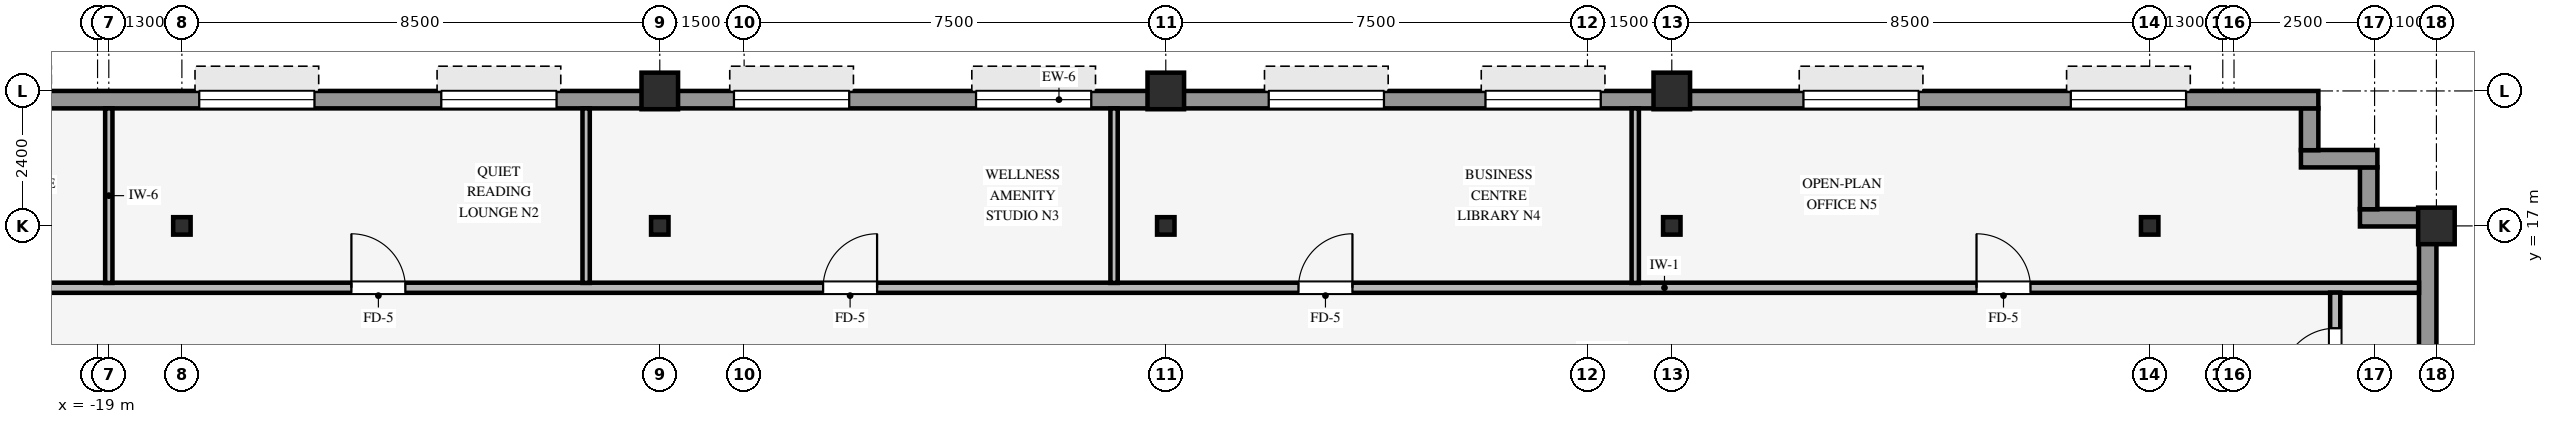
"""IFC4 building model, lengths in metres.
Left out: names, types, materials, properties, quantities, classifications, styles, units other than length and angle.
Written with IfcOpenShell. Run it as: python <this file> out.ifc"""

import sys

from ifc_helpers import new_model, si_unit, direction, frame, frame_2d, origin, origin_2d, place, context, subcontext, project, spatial, rectangle, hollow_rectangle, i_section, extrude, source, transform, mapped, element, fill, save


model = new_model("IFC4")
c1 = context("Model", 3, precision=1e-05, world=origin(), true_north=direction((0.0, 1.0)))
c2 = subcontext(c1, "Body", "Model", "MODEL_VIEW")
j1 = project(units=[si_unit("LENGTHUNIT", "METRE"), si_unit("PLANEANGLEUNIT", "RADIAN")], contexts=[c1])
p1 = place(None, origin())
s1 = spatial("IfcSite", under=j1, at=p1, CompositionType="ELEMENT")
p2 = place(p1, origin())
s2 = spatial("IfcBuilding", under=s1, at=p2, CompositionType="ELEMENT")
p3 = place(p2, frame((0.0, 0.0, 174.95)))
s3 = spatial("IfcBuildingStorey", under=s2, at=p3, CompositionType="ELEMENT", Elevation=174.95)
for number, where, z_axis, x_axis in (
    (1, (22.6, 17.0, 0.0), (0.0, 0.0, 1.0), (1.0, 0.0, 0.0)),
    (2, (-9.0, 19.4, 0.0), (0.0, 0.0, 1.0), (1.0, 0.0, 0.0)),
    (3, (0.0, 19.4, 0.0), (0.0, 0.0, 1.0), (1.0, 0.0, 0.0)),
    (4, (9.0, 19.4, 0.0), (0.0, 0.0, 1.0), (1.0, 0.0, 0.0)),
):
    element("IfcColumn", number, at=place(p3, frame(where, z_axis=z_axis, x_axis=x_axis)), inside=s3, PredefinedType="COLUMN", context=c2, shape_type="SweptSolid", body=[
        extrude(hollow_rectangle(XDim=0.65, YDim=0.65, WallThickness=0.04, InnerFilletRadius=0.04, OuterFilletRadius=0.08, at=origin_2d()), origin(), (0.0, 0.0, 1.0), 3.37),
    ])
for number, where, z_axis, x_axis in (
    (5, (0.0, 17.0, 0.0), (0.0, 0.0, 1.0), (1.0, 0.0, 0.0)),
    (6, (-17.5, 17.0, 0.0), (0.0, 0.0, 1.0), (1.0, 0.0, 0.0)),
    (7, (-9.0, 17.0, 0.0), (0.0, 0.0, 1.0), (1.0, 0.0, 0.0)),
    (8, (9.0, 17.0, 0.0), (0.0, 0.0, 1.0), (1.0, 0.0, 0.0)),
    (9, (17.5, 17.0, 0.0), (0.0, 0.0, 1.0), (1.0, 0.0, 0.0)),
):
    element("IfcColumn", number, at=place(p3, frame(where, z_axis=z_axis, x_axis=x_axis)), inside=s3, PredefinedType="COLUMN", context=c2, shape_type="SweptSolid", body=[
        extrude(i_section(OverallWidth=0.31, OverallDepth=0.31, WebThickness=0.015, FlangeThickness=0.015, FilletRadius=0.015, at=origin_2d()), origin(), (0.0, 0.0, 1.0), 3.37),
    ])
p4 = place(p3, frame((22.445, -20.794, 0.0), z_axis=(0.0, 0.0, 1.0), x_axis=(0.0, 1.0, 0.0)))
e10 = element("IfcWall", 10, at=p4, inside=s3, PredefinedType="STANDARD", context=c2, shape_type="SweptSolid", body=[
    extrude(rectangle(XDim=37.788, YDim=0.31, at=frame_2d((18.894, 0.0))), origin(), (0.0, 0.0, 1.0), 2.705),
])
p5 = place(p4, frame((16.474, 0.0, 0.0), z_axis=(0.0, 0.0, 1.0), x_axis=(-1.0, 0.0, 0.0)))
e11 = element("IfcOpeningElement", 11, at=p5, cuts=e10, PredefinedType="OPENING", context=c2, shape_type="SweptSolid", body=[
    extrude(rectangle(XDim=0.98, YDim=2.15, at=frame_2d((0.49, 1.075))), frame((0.0, 0.165, 0.0), z_axis=(0.0, -1.0, 0.0), x_axis=(1.0, 0.0, 0.0)), (0.0, 0.0, 1.0), 0.33),
])
p6 = place(p4, frame((1.581, 0.0, 0.8)))
e12 = element("IfcOpeningElement", 12, at=p6, cuts=e10, PredefinedType="OPENING", context=c2, shape_type="SweptSolid", body=[
    extrude(rectangle(XDim=1.25, YDim=1.52, at=frame_2d((0.625, 0.76))), frame((0.0, 0.165, 0.0), z_axis=(0.0, -1.0, 0.0), x_axis=(1.0, 0.0, 0.0)), (0.0, 0.0, 1.0), 0.33),
])
p7 = place(p4, frame((8.044, 0.0, 0.8)))
e13 = element("IfcOpeningElement", 13, at=p7, cuts=e10, PredefinedType="OPENING", context=c2, shape_type="SweptSolid", body=[
    extrude(rectangle(XDim=1.25, YDim=1.52, at=frame_2d((0.625, 0.76))), frame((0.0, 0.165, 0.0), z_axis=(0.0, -1.0, 0.0), x_axis=(1.0, 0.0, 0.0)), (0.0, 0.0, 1.0), 0.33),
])
p8 = place(p4, frame((13.156, 0.0, 0.8)))
e14 = element("IfcOpeningElement", 14, at=p8, cuts=e10, PredefinedType="OPENING", context=c2, shape_type="SweptSolid", body=[
    extrude(rectangle(XDim=1.25, YDim=1.52, at=frame_2d((0.625, 0.76))), frame((0.0, 0.165, 0.0), z_axis=(0.0, -1.0, 0.0), x_axis=(1.0, 0.0, 0.0)), (0.0, 0.0, 1.0), 0.33),
])
p9 = place(p4, frame((18.269, 0.0, 0.8)))
e15 = element("IfcOpeningElement", 15, at=p9, cuts=e10, PredefinedType="OPENING", context=c2, shape_type="SweptSolid", body=[
    extrude(rectangle(XDim=1.25, YDim=1.52, at=frame_2d((0.625, 0.76))), frame((0.0, 0.165, 0.0), z_axis=(0.0, -1.0, 0.0), x_axis=(1.0, 0.0, 0.0)), (0.0, 0.0, 1.0), 0.33),
])
p10 = place(p4, frame((23.382, 0.0, 0.8)))
e16 = element("IfcOpeningElement", 16, at=p10, cuts=e10, PredefinedType="OPENING", context=c2, shape_type="SweptSolid", body=[
    extrude(rectangle(XDim=1.25, YDim=1.52, at=frame_2d((0.625, 0.76))), frame((0.0, 0.165, 0.0), z_axis=(0.0, -1.0, 0.0), x_axis=(1.0, 0.0, 0.0)), (0.0, 0.0, 1.0), 0.33),
])
p11 = place(p4, frame((28.044, 0.0, 0.8)))
e17 = element("IfcOpeningElement", 17, at=p11, cuts=e10, PredefinedType="OPENING", context=c2, shape_type="SweptSolid", body=[
    extrude(rectangle(XDim=1.25, YDim=1.52, at=frame_2d((0.625, 0.76))), frame((0.0, 0.165, 0.0), z_axis=(0.0, -1.0, 0.0), x_axis=(1.0, 0.0, 0.0)), (0.0, 0.0, 1.0), 0.33),
])
p12 = place(p4, frame((33.607, 0.0, 0.8)))
e18 = element("IfcOpeningElement", 18, at=p12, cuts=e10, PredefinedType="OPENING", context=c2, shape_type="SweptSolid", body=[
    extrude(rectangle(XDim=1.25, YDim=1.52, at=frame_2d((0.625, 0.76))), frame((0.0, 0.165, 0.0), z_axis=(0.0, -1.0, 0.0), x_axis=(1.0, 0.0, 0.0)), (0.0, 0.0, 1.0), 0.33),
])
p13 = place(p3, frame((21.24, 17.145, 0.0), z_axis=(0.0, 0.0, 1.0), x_axis=(1.0, 0.0, 0.0)))
e19 = element("IfcWall", 19, at=p13, inside=s3, PredefinedType="STANDARD", context=c2, shape_type="SweptSolid", body=[
    extrude(rectangle(XDim=1.36, YDim=0.31, at=frame_2d((0.68, 0.0))), origin(), (0.0, 0.0, 1.0), 2.816),
])
p14 = place(p3, frame((21.395, 17.296, 0.0), z_axis=(0.0, 0.0, 1.0), x_axis=(0.0, 1.0, 0.0)))
e20 = element("IfcWall", 20, at=p14, inside=s3, PredefinedType="STANDARD", context=c2, shape_type="SweptSolid", body=[
    extrude(rectangle(XDim=0.748, YDim=0.31, at=frame_2d((0.374, 0.0))), origin(), (0.0, 0.0, 1.0), 2.816),
])
p15 = place(p3, frame((20.19, 18.195, 0.0), z_axis=(0.0, 0.0, 1.0), x_axis=(1.0, 0.0, 0.0)))
e21 = element("IfcWall", 21, at=p15, inside=s3, PredefinedType="STANDARD", context=c2, shape_type="SweptSolid", body=[
    extrude(rectangle(XDim=1.36, YDim=0.31, at=frame_2d((0.68, 0.0))), origin(), (0.0, 0.0, 1.0), 2.816),
])
p16 = place(p3, frame((20.345, 18.346, 0.0), z_axis=(0.0, 0.0, 1.0), x_axis=(0.0, 1.0, 0.0)))
e22 = element("IfcWall", 22, at=p16, inside=s3, PredefinedType="STANDARD", context=c2, shape_type="SweptSolid", body=[
    extrude(rectangle(XDim=0.748, YDim=0.31, at=frame_2d((0.374, 0.0))), origin(), (0.0, 0.0, 1.0), 2.816),
])
p17 = place(p3, frame((-24.3, 19.245, 0.0), z_axis=(0.0, 0.0, 1.0), x_axis=(1.0, 0.0, 0.0)))
e23 = element("IfcWall", 23, at=p17, inside=s3, PredefinedType="STANDARD", context=c2, shape_type="SweptSolid", body=[
    extrude(rectangle(XDim=44.8, YDim=0.31, at=frame_2d((22.4, 0.0))), origin(), (0.0, 0.0, 1.0), 2.705),
])
p18 = place(p17, frame((2.353, 0.0, 0.8)))
e24 = element("IfcOpeningElement", 24, at=p18, cuts=e23, PredefinedType="OPENING", context=c2, shape_type="SweptSolid", body=[
    extrude(rectangle(XDim=2.05, YDim=1.52, at=frame_2d((1.025, 0.76))), frame((0.0, 0.165, 0.0), z_axis=(0.0, -1.0, 0.0), x_axis=(1.0, 0.0, 0.0)), (0.0, 0.0, 1.0), 0.33),
])
p19 = place(p17, frame((7.108, 0.0, 0.8)))
e25 = element("IfcOpeningElement", 25, at=p19, cuts=e23, PredefinedType="OPENING", context=c2, shape_type="SweptSolid", body=[
    extrude(rectangle(XDim=2.05, YDim=1.52, at=frame_2d((1.025, 0.76))), frame((0.0, 0.165, 0.0), z_axis=(0.0, -1.0, 0.0), x_axis=(1.0, 0.0, 0.0)), (0.0, 0.0, 1.0), 0.33),
])
p20 = place(p17, frame((11.414, 0.0, 0.8)))
e26 = element("IfcOpeningElement", 26, at=p20, cuts=e23, PredefinedType="OPENING", context=c2, shape_type="SweptSolid", body=[
    extrude(rectangle(XDim=2.05, YDim=1.52, at=frame_2d((1.025, 0.76))), frame((0.0, 0.165, 0.0), z_axis=(0.0, -1.0, 0.0), x_axis=(1.0, 0.0, 0.0)), (0.0, 0.0, 1.0), 0.33),
])
p21 = place(p17, frame((16.619, 0.0, 0.8)))
e27 = element("IfcOpeningElement", 27, at=p21, cuts=e23, PredefinedType="OPENING", context=c2, shape_type="SweptSolid", body=[
    extrude(rectangle(XDim=2.05, YDim=1.52, at=frame_2d((1.025, 0.76))), frame((0.0, 0.165, 0.0), z_axis=(0.0, -1.0, 0.0), x_axis=(1.0, 0.0, 0.0)), (0.0, 0.0, 1.0), 0.33),
])
p22 = place(p17, frame((20.925, 0.0, 0.8)))
e28 = element("IfcOpeningElement", 28, at=p22, cuts=e23, PredefinedType="OPENING", context=c2, shape_type="SweptSolid", body=[
    extrude(rectangle(XDim=2.05, YDim=1.52, at=frame_2d((1.025, 0.76))), frame((0.0, 0.165, 0.0), z_axis=(0.0, -1.0, 0.0), x_axis=(1.0, 0.0, 0.0)), (0.0, 0.0, 1.0), 0.33),
])
p23 = place(p17, frame((26.131, 0.0, 0.8)))
e29 = element("IfcOpeningElement", 29, at=p23, cuts=e23, PredefinedType="OPENING", context=c2, shape_type="SweptSolid", body=[
    extrude(rectangle(XDim=2.05, YDim=1.52, at=frame_2d((1.025, 0.76))), frame((0.0, 0.165, 0.0), z_axis=(0.0, -1.0, 0.0), x_axis=(1.0, 0.0, 0.0)), (0.0, 0.0, 1.0), 0.33),
])
p24 = place(p17, frame((29.986, 0.0, 0.8)))
e30 = element("IfcOpeningElement", 30, at=p24, cuts=e23, PredefinedType="OPENING", context=c2, shape_type="SweptSolid", body=[
    extrude(rectangle(XDim=2.05, YDim=1.52, at=frame_2d((1.025, 0.76))), frame((0.0, 0.165, 0.0), z_axis=(0.0, -1.0, 0.0), x_axis=(1.0, 0.0, 0.0)), (0.0, 0.0, 1.0), 0.33),
])
p25 = place(p17, frame((35.642, 0.0, 0.8)))
e31 = element("IfcOpeningElement", 31, at=p25, cuts=e23, PredefinedType="OPENING", context=c2, shape_type="SweptSolid", body=[
    extrude(rectangle(XDim=2.05, YDim=1.52, at=frame_2d((1.025, 0.76))), frame((0.0, 0.165, 0.0), z_axis=(0.0, -1.0, 0.0), x_axis=(1.0, 0.0, 0.0)), (0.0, 0.0, 1.0), 0.33),
])
p26 = place(p17, frame((40.397, 0.0, 0.8)))
e32 = element("IfcOpeningElement", 32, at=p26, cuts=e23, PredefinedType="OPENING", context=c2, shape_type="SweptSolid", body=[
    extrude(rectangle(XDim=2.05, YDim=1.52, at=frame_2d((1.025, 0.76))), frame((0.0, 0.165, 0.0), z_axis=(0.0, -1.0, 0.0), x_axis=(1.0, 0.0, 0.0)), (0.0, 0.0, 1.0), 0.33),
])
p27 = place(p3, frame((-26.09, 15.9, 0.0), z_axis=(0.0, 0.0, 1.0), x_axis=(1.0, 0.0, 0.0)))
e33 = element("IfcWall", 33, at=p27, inside=s3, PredefinedType="PARTITIONING", context=c2, shape_type="SweptSolid", body=[
    extrude(rectangle(XDim=48.38, YDim=0.18, at=frame_2d((24.19, 0.0))), origin(), (0.0, 0.0, 1.0), 3.36),
])
p28 = place(p27, frame((40.51, 0.0, 0.0)))
e34 = element("IfcOpeningElement", 34, at=p28, cuts=e33, PredefinedType="OPENING", context=c2, shape_type="SweptSolid", body=[
    extrude(rectangle(XDim=0.96, YDim=2.1, at=frame_2d((0.48, 1.05))), frame((0.0, 0.1, 0.0), z_axis=(0.0, -1.0, 0.0), x_axis=(1.0, 0.0, 0.0)), (0.0, 0.0, 1.0), 0.2),
])
p29 = place(p27, frame((19.995, 0.0, 0.0)))
e35 = element("IfcOpeningElement", 35, at=p29, cuts=e33, PredefinedType="OPENING", context=c2, shape_type="SweptSolid", body=[
    extrude(rectangle(XDim=0.96, YDim=2.1, at=frame_2d((0.48, 1.05))), frame((0.0, 0.1, 0.0), z_axis=(0.0, -1.0, 0.0), x_axis=(1.0, 0.0, 0.0)), (0.0, 0.0, 1.0), 0.2),
])
p30 = place(p27, frame((28.45, 0.0, 0.0)))
e36 = element("IfcOpeningElement", 36, at=p30, cuts=e33, PredefinedType="OPENING", context=c2, shape_type="SweptSolid", body=[
    extrude(rectangle(XDim=0.96, YDim=2.1, at=frame_2d((0.48, 1.05))), frame((0.0, 0.1, 0.0), z_axis=(0.0, -1.0, 0.0), x_axis=(1.0, 0.0, 0.0)), (0.0, 0.0, 1.0), 0.2),
])
p31 = place(p27, frame((11.605, 0.0, 0.0)))
e37 = element("IfcOpeningElement", 37, at=p31, cuts=e33, PredefinedType="OPENING", context=c2, shape_type="SweptSolid", body=[
    extrude(rectangle(XDim=0.96, YDim=2.1, at=frame_2d((0.48, 1.05))), frame((0.0, 0.1, 0.0), z_axis=(0.0, -1.0, 0.0), x_axis=(1.0, 0.0, 0.0)), (0.0, 0.0, 1.0), 0.2),
])
p32 = place(p27, frame((2.465, 0.0, 0.0)))
e38 = element("IfcOpeningElement", 38, at=p32, cuts=e33, PredefinedType="OPENING", context=c2, shape_type="SweptSolid", body=[
    extrude(rectangle(XDim=0.96, YDim=2.1, at=frame_2d((0.48, 1.05))), frame((0.0, 0.1, 0.0), z_axis=(0.0, -1.0, 0.0), x_axis=(1.0, 0.0, 0.0)), (0.0, 0.0, 1.0), 0.2),
])
for number, where, z_axis, x_axis in (
    (39, (-18.8, 15.986, 0.0), (0.0, 0.0, 1.0), (0.0, 1.0, 0.0)),
    (40, (-10.31, 15.986, 0.0), (0.0, 0.0, 1.0), (0.0, 1.0, 0.0)),
    (41, (-0.92, 15.986, 0.0), (0.0, 0.0, 1.0), (0.0, 1.0, 0.0)),
    (42, (8.35, 15.986, 0.0), (0.0, 0.0, 1.0), (0.0, 1.0, 0.0)),
):
    element("IfcWall", number, at=place(p3, frame(where, z_axis=z_axis, x_axis=x_axis)), inside=s3, PredefinedType="PARTITIONING", context=c2, shape_type="SweptSolid", body=[
        extrude(rectangle(XDim=3.104, YDim=0.13, at=frame_2d((1.552, 0.0))), origin(), (0.0, 0.0, 1.0), 3.36),
    ])
p33 = place(p3, frame((20.8, 13.586, 0.0), z_axis=(0.0, 0.0, 1.0), x_axis=(0.0, 1.0, 0.0)))
e43 = element("IfcWall", 43, at=p33, inside=s3, PredefinedType="PARTITIONING", context=c2, shape_type="SweptSolid", body=[
    extrude(rectangle(XDim=2.228, YDim=0.18, at=frame_2d((1.114, 0.0))), origin(), (0.0, 0.0, 1.0), 3.36),
])
p34 = place(p33, frame((0.634, 0.0, 0.0)))
e44 = element("IfcOpeningElement", 44, at=p34, cuts=e43, PredefinedType="OPENING", context=c2, shape_type="SweptSolid", body=[
    extrude(rectangle(XDim=0.96, YDim=2.1, at=frame_2d((0.48, 1.05))), frame((0.0, 0.1, 0.0), z_axis=(0.0, -1.0, 0.0), x_axis=(1.0, 0.0, 0.0)), (0.0, 0.0, 1.0), 0.2),
])
m1 = source(origin(), c2, "Body", "SweptSolid", [
    extrude(rectangle(XDim=2.05, YDim=1.52, at=frame_2d((1.025, 0.76))), frame((0.0, 0.03, 0.0), z_axis=(0.0, -1.0, 0.0), x_axis=(1.0, 0.0, 0.0)), (0.0, 0.0, 1.0), 0.06),
])
p35 = place(p19, origin())
e45 = element("IfcWindow", 45, at=p35, inside=s3, PartitioningType="SINGLE_PANEL", PredefinedType="WINDOW", context=c2, shape_type="MappedRepresentation", body=[
    mapped(m1, transform((0.0, 0.0, 0.0), scale=1.0)),
])
fill(e25, e45)
p36 = place(p20, origin())
e46 = element("IfcWindow", 46, at=p36, inside=s3, PartitioningType="SINGLE_PANEL", PredefinedType="WINDOW", context=c2, shape_type="MappedRepresentation", body=[
    mapped(m1, transform((0.0, 0.0, 0.0), scale=1.0)),
])
fill(e26, e46)
p37 = place(p21, origin())
e47 = element("IfcWindow", 47, at=p37, inside=s3, PartitioningType="SINGLE_PANEL", PredefinedType="WINDOW", context=c2, shape_type="MappedRepresentation", body=[
    mapped(m1, transform((0.0, 0.0, 0.0), scale=1.0)),
])
fill(e27, e47)
p38 = place(p22, origin())
e48 = element("IfcWindow", 48, at=p38, inside=s3, PartitioningType="SINGLE_PANEL", PredefinedType="WINDOW", context=c2, shape_type="MappedRepresentation", body=[
    mapped(m1, transform((0.0, 0.0, 0.0), scale=1.0)),
])
fill(e28, e48)
p39 = place(p23, origin())
e49 = element("IfcWindow", 49, at=p39, inside=s3, PartitioningType="SINGLE_PANEL", PredefinedType="WINDOW", context=c2, shape_type="MappedRepresentation", body=[
    mapped(m1, transform((0.0, 0.0, 0.0), scale=1.0)),
])
fill(e29, e49)
p40 = place(p24, origin())
e50 = element("IfcWindow", 50, at=p40, inside=s3, PartitioningType="SINGLE_PANEL", PredefinedType="WINDOW", context=c2, shape_type="MappedRepresentation", body=[
    mapped(m1, transform((0.0, 0.0, 0.0), scale=1.0)),
])
fill(e30, e50)
p41 = place(p25, origin())
e51 = element("IfcWindow", 51, at=p41, inside=s3, PartitioningType="SINGLE_PANEL", PredefinedType="WINDOW", context=c2, shape_type="MappedRepresentation", body=[
    mapped(m1, transform((0.0, 0.0, 0.0), scale=1.0)),
])
fill(e31, e51)
p42 = place(p26, origin())
e52 = element("IfcWindow", 52, at=p42, inside=s3, PartitioningType="SINGLE_PANEL", PredefinedType="WINDOW", context=c2, shape_type="MappedRepresentation", body=[
    mapped(m1, transform((0.0, 0.0, 0.0), scale=1.0)),
])
fill(e32, e52)
m2 = source(origin(), c2, "Body", "SweptSolid", [
    extrude(rectangle(XDim=0.96, YDim=2.1, at=frame_2d((0.48, 1.05))), frame((0.0, 0.025, 0.0), z_axis=(0.0, -1.0, 0.0), x_axis=(1.0, 0.0, 0.0)), (0.0, 0.0, 1.0), 0.05),
])
p43 = place(p28, origin())
e53 = element("IfcDoor", 53, at=p43, inside=s3, OperationType="SINGLE_SWING_LEFT", PredefinedType="DOOR", context=c2, shape_type="MappedRepresentation", body=[
    mapped(m2, transform((0.0, 0.0, 0.0), scale=1.0)),
])
fill(e34, e53)
p44 = place(p29, origin())
e54 = element("IfcDoor", 54, at=p44, inside=s3, OperationType="SINGLE_SWING_RIGHT", PredefinedType="DOOR", context=c2, shape_type="MappedRepresentation", body=[
    mapped(m2, transform((0.0, 0.0, 0.0), scale=1.0)),
])
fill(e35, e54)
p45 = place(p30, origin())
e55 = element("IfcDoor", 55, at=p45, inside=s3, OperationType="SINGLE_SWING_RIGHT", PredefinedType="DOOR", context=c2, shape_type="MappedRepresentation", body=[
    mapped(m2, transform((0.0, 0.0, 0.0), scale=1.0)),
])
fill(e36, e55)
p46 = place(p31, origin())
e56 = element("IfcDoor", 56, at=p46, inside=s3, OperationType="SINGLE_SWING_LEFT", PredefinedType="DOOR", context=c2, shape_type="MappedRepresentation", body=[
    mapped(m2, transform((0.0, 0.0, 0.0), scale=1.0)),
])
fill(e37, e56)
p47 = place(p34, origin())
e57 = element("IfcDoor", 57, at=p47, inside=s3, OperationType="SINGLE_SWING_LEFT", PredefinedType="DOOR", context=c2, shape_type="MappedRepresentation", body=[
    mapped(m2, transform((0.0, 0.0, 0.0), scale=1.0)),
])
fill(e44, e57)
save(model, sys.argv[1])
